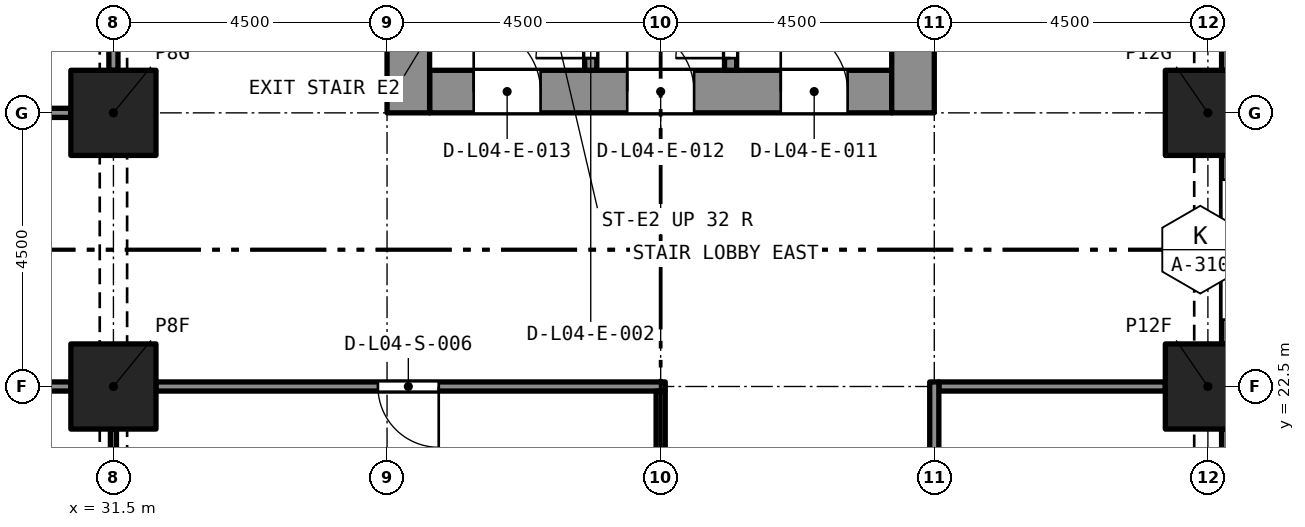
"""IFC4 building model, lengths in metres.
Left out: names, types, materials, properties, quantities, classifications, styles, units other than length and angle.
Written with IfcOpenShell. Run it as: python <this file> out.ifc"""

import sys

from ifc_helpers import new_model, si_unit, direction, frame, frame_2d, origin, origin_2d, place, context, subcontext, project, spatial, rectangle, extrude, element, fill, save


model = new_model("IFC4")
c1 = context("Model", 3, precision=1e-05, world=origin(), true_north=direction((0.0, 1.0)))
c2 = subcontext(c1, "Body", "Model", "MODEL_VIEW")
j1 = project(units=[si_unit("LENGTHUNIT", "METRE"), si_unit("PLANEANGLEUNIT", "RADIAN")], contexts=[c1])
p1 = place(None, origin())
s1 = spatial("IfcSite", under=j1, at=p1, CompositionType="ELEMENT")
p2 = place(p1, origin())
s2 = spatial("IfcBuilding", under=s1, at=p2, CompositionType="ELEMENT")
p3 = place(p2, frame((0.0, 0.0, 21.0)))
s3 = spatial("IfcBuildingStorey", under=s2, at=p3, CompositionType="ELEMENT", Elevation=21.0)
for number, where, z_axis, x_axis in (
    (1, (31.5, 22.5, 0.0), (0.0, 0.0, 1.0), (1.0, 0.0, 0.0)),
    (2, (49.5, 22.5, 0.0), (0.0, 0.0, 1.0), (1.0, 0.0, 0.0)),
    (3, (31.5, 27.0, 0.0), (0.0, 0.0, 1.0), (1.0, 0.0, 0.0)),
    (4, (49.5, 27.0, 0.0), (0.0, 0.0, 1.0), (1.0, 0.0, 0.0)),
):
    element("IfcColumn", number, at=place(p3, frame(where, z_axis=z_axis, x_axis=x_axis)), inside=s3, PredefinedType="COLUMN", context=c2, shape_type="SweptSolid", body=[
        extrude(rectangle(XDim=1.4, YDim=1.4, at=origin_2d()), origin(), (0.0, 0.0, 1.0), 5.0),
    ])
p4 = place(p3, frame((36.7, 27.35, 0.0), z_axis=(0.0, 0.0, 1.0), x_axis=(1.0, 0.0, 0.0)))
e5 = element("IfcWall", 5, at=p4, inside=s3, PredefinedType="SOLIDWALL", context=c2, shape_type="SweptSolid", body=[
    extrude(rectangle(XDim=7.6, YDim=0.7, at=frame_2d((3.8, 0.0))), origin(), (0.0, 0.0, 1.0), 5.0),
])
p5 = place(p4, frame((5.775, 0.0, 0.0)))
e6 = element("IfcOpeningElement", 6, at=p5, cuts=e5, PredefinedType="OPENING", context=c2, shape_type="SweptSolid", body=[
    extrude(rectangle(XDim=1.1, YDim=2.1, at=frame_2d((0.55, 1.05))), frame((0.0, 0.36, 0.0), z_axis=(0.0, -1.0, 0.0), x_axis=(1.0, 0.0, 0.0)), (0.0, 0.0, 1.0), 0.72),
])
p6 = place(p4, frame((3.25, 0.0, 0.0)))
e7 = element("IfcOpeningElement", 7, at=p6, cuts=e5, PredefinedType="OPENING", context=c2, shape_type="SweptSolid", body=[
    extrude(rectangle(XDim=1.1, YDim=2.1, at=frame_2d((0.55, 1.05))), frame((0.0, 0.36, 0.0), z_axis=(0.0, -1.0, 0.0), x_axis=(1.0, 0.0, 0.0)), (0.0, 0.0, 1.0), 0.72),
])
p7 = place(p4, frame((0.725, 0.0, 0.0)))
e8 = element("IfcOpeningElement", 8, at=p7, cuts=e5, PredefinedType="OPENING", context=c2, shape_type="SweptSolid", body=[
    extrude(rectangle(XDim=1.1, YDim=2.1, at=frame_2d((0.55, 1.05))), frame((0.0, 0.36, 0.0), z_axis=(0.0, -1.0, 0.0), x_axis=(1.0, 0.0, 0.0)), (0.0, 0.0, 1.0), 0.72),
])
p8 = place(p3, frame((36.35, 27.0, 0.0), z_axis=(0.0, 0.0, 1.0), x_axis=(0.0, 1.0, 0.0)))
e9 = element("IfcWall", 9, at=p8, inside=s3, PredefinedType="SOLIDWALL", context=c2, shape_type="SweptSolid", body=[
    extrude(rectangle(XDim=13.5, YDim=0.7, at=frame_2d((6.75, 0.0))), origin(), (0.0, 0.0, 1.0), 5.0),
])
p9 = place(p8, frame((8.95, 0.0, 0.0)))
e10 = element("IfcOpeningElement", 10, at=p9, cuts=e9, PredefinedType="OPENING", context=c2, shape_type="SweptSolid", body=[
    extrude(rectangle(XDim=1.2, YDim=2.1, at=frame_2d((0.6, 1.05))), frame((0.0, 0.36, 0.0), z_axis=(0.0, -1.0, 0.0), x_axis=(1.0, 0.0, 0.0)), (0.0, 0.0, 1.0), 0.72),
])
p10 = place(p3, frame((44.65, 27.0, 0.0), z_axis=(0.0, 0.0, 1.0), x_axis=(0.0, 1.0, 0.0)))
e11 = element("IfcWall", 11, at=p10, inside=s3, PredefinedType="SOLIDWALL", context=c2, shape_type="SweptSolid", body=[
    extrude(rectangle(XDim=13.5, YDim=0.7, at=frame_2d((6.75, 0.0))), origin(), (0.0, 0.0, 1.0), 5.0),
])
p11 = place(p10, frame((8.95, 0.0, 0.0)))
e12 = element("IfcOpeningElement", 12, at=p11, cuts=e11, PredefinedType="OPENING", context=c2, shape_type="SweptSolid", body=[
    extrude(rectangle(XDim=1.2, YDim=2.1, at=frame_2d((0.6, 1.05))), frame((0.0, 0.36, 0.0), z_axis=(0.0, -1.0, 0.0), x_axis=(1.0, 0.0, 0.0)), (0.0, 0.0, 1.0), 0.72),
])
p12 = place(p3, frame((49.875, 21.8, 0.0), z_axis=(0.0, 0.0, 1.0), x_axis=(0.0, -1.0, 0.0)))
e13 = element("IfcWall", 13, at=p12, inside=s3, PredefinedType="SOLIDWALL", context=c2, shape_type="SweptSolid", body=[
    extrude(rectangle(XDim=3.1, YDim=0.3, at=frame_2d((1.55, 0.0))), origin(), (0.0, 0.0, 1.0), 5.0),
])
p13 = place(p12, frame((0.4, 0.0, 0.45)))
e14 = element("IfcOpeningElement", 14, at=p13, cuts=e13, PredefinedType="OPENING", context=c2, shape_type="SweptSolid", body=[
    extrude(rectangle(XDim=2.3, YDim=3.3, at=frame_2d((1.15, 1.65))), frame((0.0, 0.16, 0.0), z_axis=(0.0, -1.0, 0.0), x_axis=(1.0, 0.0, 0.0)), (0.0, 0.0, 1.0), 0.32),
])
p14 = place(p3, frame((49.875, 26.3, 0.0), z_axis=(0.0, 0.0, 1.0), x_axis=(0.0, -1.0, 0.0)))
e15 = element("IfcWall", 15, at=p14, inside=s3, PredefinedType="SOLIDWALL", context=c2, shape_type="SweptSolid", body=[
    extrude(rectangle(XDim=3.1, YDim=0.3, at=frame_2d((1.55, 0.0))), origin(), (0.0, 0.0, 1.0), 5.0),
])
p15 = place(p14, frame((0.4, 0.0, 0.45)))
e16 = element("IfcOpeningElement", 16, at=p15, cuts=e15, PredefinedType="OPENING", context=c2, shape_type="SweptSolid", body=[
    extrude(rectangle(XDim=2.3, YDim=3.3, at=frame_2d((1.15, 1.65))), frame((0.0, 0.16, 0.0), z_axis=(0.0, -1.0, 0.0), x_axis=(1.0, 0.0, 0.0)), (0.0, 0.0, 1.0), 0.32),
])
p16 = place(p3, frame((49.875, 30.8, 0.0), z_axis=(0.0, 0.0, 1.0), x_axis=(0.0, -1.0, 0.0)))
e17 = element("IfcWall", 17, at=p16, inside=s3, PredefinedType="SOLIDWALL", context=c2, shape_type="SweptSolid", body=[
    extrude(rectangle(XDim=3.1, YDim=0.3, at=frame_2d((1.55, 0.0))), origin(), (0.0, 0.0, 1.0), 5.0),
])
p17 = place(p16, frame((0.4, 0.0, 0.45)))
e18 = element("IfcOpeningElement", 18, at=p17, cuts=e17, PredefinedType="OPENING", context=c2, shape_type="SweptSolid", body=[
    extrude(rectangle(XDim=2.3, YDim=3.3, at=frame_2d((1.15, 1.65))), frame((0.0, 0.16, 0.0), z_axis=(0.0, -1.0, 0.0), x_axis=(1.0, 0.0, 0.0)), (0.0, 0.0, 1.0), 0.32),
])
p18 = place(p3, frame((41.65, 27.7, 0.0), z_axis=(0.0, 0.0, 1.0), x_axis=(0.0, 1.0, 0.0)))
e19 = element("IfcWall", 19, at=p18, inside=s3, PredefinedType="SOLIDWALL", context=c2, shape_type="SweptSolid", body=[
    extrude(rectangle(XDim=5.4, YDim=0.2, at=frame_2d((2.7, 0.0))), origin(), (0.0, 0.0, 1.0), 4.65),
])
p19 = place(p18, frame((0.2, 0.0, 0.0)))
e20 = element("IfcOpeningElement", 20, at=p19, cuts=e19, PredefinedType="OPENING", context=c2, shape_type="SweptSolid", body=[
    extrude(rectangle(XDim=0.9, YDim=2.1, at=frame_2d((0.45, 1.05))), frame((0.0, 0.11, 0.0), z_axis=(0.0, -1.0, 0.0), x_axis=(1.0, 0.0, 0.0)), (0.0, 0.0, 1.0), 0.22),
])
p20 = place(p3, frame((39.35, 27.7, 0.0), z_axis=(0.0, 0.0, 1.0), x_axis=(0.0, 1.0, 0.0)))
e21 = element("IfcWall", 21, at=p20, inside=s3, PredefinedType="SOLIDWALL", context=c2, shape_type="SweptSolid", body=[
    extrude(rectangle(XDim=5.4, YDim=0.2, at=frame_2d((2.7, 0.0))), origin(), (0.0, 0.0, 1.0), 4.65),
])
p21 = place(p20, frame((0.2, 0.0, 0.0)))
e22 = element("IfcOpeningElement", 22, at=p21, cuts=e21, PredefinedType="OPENING", context=c2, shape_type="SweptSolid", body=[
    extrude(rectangle(XDim=0.9, YDim=2.1, at=frame_2d((0.45, 1.05))), frame((0.0, 0.11, 0.0), z_axis=(0.0, -1.0, 0.0), x_axis=(1.0, 0.0, 0.0)), (0.0, 0.0, 1.0), 0.22),
])
p22 = place(p3, frame((18.7, 27.0, 0.0), z_axis=(0.0, 0.0, 1.0), x_axis=(1.0, 0.0, 0.0)))
e23 = element("IfcWall", 23, at=p22, inside=s3, PredefinedType="PARTITIONING", context=c2, shape_type="SweptSolid", body=[
    extrude(rectangle(XDim=12.1, YDim=0.15, at=frame_2d((6.05, 0.0))), origin(), (0.0, 0.0, 1.0), 4.55),
])
p23 = place(p22, frame((5.45, 0.0, 0.0)))
e24 = element("IfcOpeningElement", 24, at=p23, cuts=e23, PredefinedType="OPENING", context=c2, shape_type="SweptSolid", body=[
    extrude(rectangle(XDim=1.2, YDim=2.1, at=frame_2d((0.6, 1.05))), frame((0.0, 0.085, 0.0), z_axis=(0.0, -1.0, 0.0), x_axis=(1.0, 0.0, 0.0)), (0.0, 0.0, 1.0), 0.17),
])
p24 = place(p3, frame((30.8, 22.5, 0.0), z_axis=(0.0, 0.0, 1.0), x_axis=(-1.0, 0.0, 0.0)))
e25 = element("IfcWall", 25, at=p24, inside=s3, PredefinedType="PARTITIONING", context=c2, shape_type="SweptSolid", body=[
    extrude(rectangle(XDim=12.1, YDim=0.15, at=frame_2d((6.05, 0.0))), origin(), (0.0, 0.0, 1.0), 4.55),
])
p25 = place(p24, frame((5.45, 0.0, 0.0)))
e26 = element("IfcOpeningElement", 26, at=p25, cuts=e25, PredefinedType="OPENING", context=c2, shape_type="SweptSolid", body=[
    extrude(rectangle(XDim=1.2, YDim=2.1, at=frame_2d((0.6, 1.05))), frame((0.0, 0.085, 0.0), z_axis=(0.0, -1.0, 0.0), x_axis=(1.0, 0.0, 0.0)), (0.0, 0.0, 1.0), 0.17),
])
p26 = place(p3, frame((31.5, 27.7, 0.0), z_axis=(0.0, 0.0, 1.0), x_axis=(0.0, 1.0, 0.0)))
e27 = element("IfcWall", 27, at=p26, inside=s3, PredefinedType="PARTITIONING", context=c2, shape_type="SweptSolid", body=[
    extrude(rectangle(XDim=3.1, YDim=0.15, at=frame_2d((1.55, 0.0))), origin(), (0.0, 0.0, 1.0), 4.18),
])
p27 = place(p3, frame((31.5, 18.7, 0.0), z_axis=(0.0, 0.0, 1.0), x_axis=(0.0, 1.0, 0.0)))
e28 = element("IfcWall", 28, at=p27, inside=s3, PredefinedType="PARTITIONING", context=c2, shape_type="SweptSolid", body=[
    extrude(rectangle(XDim=3.1, YDim=0.1, at=frame_2d((1.55, 0.0))), origin(), (0.0, 0.0, 1.0), 4.18),
])
p28 = place(p3, frame((40.575, 22.5, 0.0), z_axis=(0.0, 0.0, 1.0), x_axis=(-1.0, 0.0, 0.0)))
e29 = element("IfcWall", 29, at=p28, inside=s3, PredefinedType="PARTITIONING", context=c2, shape_type="SweptSolid", body=[
    extrude(rectangle(XDim=8.375, YDim=0.15, at=frame_2d((4.188, 0.0))), origin(), (0.0, 0.0, 1.0), 4.65),
])
p29 = place(p28, frame((3.725, 0.0, 0.0)))
e30 = element("IfcOpeningElement", 30, at=p29, cuts=e29, PredefinedType="OPENING", context=c2, shape_type="SweptSolid", body=[
    extrude(rectangle(XDim=1.0, YDim=2.1, at=frame_2d((0.5, 1.05))), frame((0.0, 0.085, 0.0), z_axis=(0.0, -1.0, 0.0), x_axis=(1.0, 0.0, 0.0)), (0.0, 0.0, 1.0), 0.17),
])
p30 = place(p3, frame((45.075, 22.5, 0.0), z_axis=(0.0, 0.0, 1.0), x_axis=(1.0, 0.0, 0.0)))
e31 = element("IfcWall", 31, at=p30, inside=s3, PredefinedType="PARTITIONING", context=c2, shape_type="SweptSolid", body=[
    extrude(rectangle(XDim=3.725, YDim=0.15, at=frame_2d((1.863, 0.0))), origin(), (0.0, 0.0, 1.0), 4.65),
])
p31 = place(p3, frame((40.5, 9.0, 0.0), z_axis=(0.0, 0.0, 1.0), x_axis=(0.0, 1.0, 0.0)))
e32 = element("IfcWall", 32, at=p31, inside=s3, PredefinedType="PARTITIONING", context=c2, shape_type="SweptSolid", body=[
    extrude(rectangle(XDim=13.425, YDim=0.15, at=frame_2d((6.712, 0.0))), origin(), (0.0, 0.0, 1.0), 4.65),
])
p32 = place(p31, frame((6.15, 0.0, 0.0)))
e33 = element("IfcOpeningElement", 33, at=p32, cuts=e32, PredefinedType="OPENING", context=c2, shape_type="SweptSolid", body=[
    extrude(rectangle(XDim=1.2, YDim=2.1, at=frame_2d((0.6, 1.05))), frame((0.0, 0.085, 0.0), z_axis=(0.0, -1.0, 0.0), x_axis=(1.0, 0.0, 0.0)), (0.0, 0.0, 1.0), 0.17),
])
p33 = place(p3, frame((45.0, 22.575, 0.0), z_axis=(0.0, 0.0, 1.0), x_axis=(0.0, -1.0, 0.0)))
e34 = element("IfcWall", 34, at=p33, inside=s3, PredefinedType="PARTITIONING", context=c2, shape_type="SweptSolid", body=[
    extrude(rectangle(XDim=9.075, YDim=0.15, at=frame_2d((4.538, 0.0))), origin(), (0.0, 0.0, 1.0), 4.65),
])
p34 = place(p33, frame((4.175, 0.0, 0.0)))
e35 = element("IfcOpeningElement", 35, at=p34, cuts=e34, PredefinedType="OPENING", context=c2, shape_type="SweptSolid", body=[
    extrude(rectangle(XDim=0.8, YDim=2.1, at=frame_2d((0.4, 1.05))), frame((0.0, 0.085, 0.0), z_axis=(0.0, -1.0, 0.0), x_axis=(1.0, 0.0, 0.0)), (0.0, 0.0, 1.0), 0.17),
])
p35 = place(p19, origin())
e36 = element("IfcDoor", 36, at=p35, inside=s3, OperationType="SINGLE_SWING_LEFT", PredefinedType="DOOR", context=c2, shape_type="SweptSolid", body=[
    extrude(rectangle(XDim=0.9, YDim=2.1, at=frame_2d((0.45, 1.05))), frame((0.0, 0.025, 0.0), z_axis=(0.0, -1.0, 0.0), x_axis=(1.0, 0.0, 0.0)), (0.0, 0.0, 1.0), 0.05),
])
fill(e20, e36)
p36 = place(p21, origin())
e37 = element("IfcDoor", 37, at=p36, inside=s3, OperationType="SINGLE_SWING_LEFT", PredefinedType="DOOR", context=c2, shape_type="SweptSolid", body=[
    extrude(rectangle(XDim=0.9, YDim=2.1, at=frame_2d((0.45, 1.05))), frame((0.0, 0.025, 0.0), z_axis=(0.0, -1.0, 0.0), x_axis=(1.0, 0.0, 0.0)), (0.0, 0.0, 1.0), 0.05),
])
fill(e22, e37)
p37 = place(p5, origin())
e38 = element("IfcDoor", 38, at=p37, inside=s3, OperationType="SINGLE_SWING_LEFT", PredefinedType="DOOR", context=c2, shape_type="SweptSolid", body=[
    extrude(rectangle(XDim=1.1, YDim=2.1, at=frame_2d((0.55, 1.05))), frame((0.0, 0.025, 0.0), z_axis=(0.0, -1.0, 0.0), x_axis=(1.0, 0.0, 0.0)), (0.0, 0.0, 1.0), 0.05),
])
fill(e6, e38)
p38 = place(p6, origin())
e39 = element("IfcDoor", 39, at=p38, inside=s3, OperationType="SINGLE_SWING_LEFT", PredefinedType="DOOR", context=c2, shape_type="SweptSolid", body=[
    extrude(rectangle(XDim=1.1, YDim=2.1, at=frame_2d((0.55, 1.05))), frame((0.0, 0.025, 0.0), z_axis=(0.0, -1.0, 0.0), x_axis=(1.0, 0.0, 0.0)), (0.0, 0.0, 1.0), 0.05),
])
fill(e7, e39)
p39 = place(p7, origin())
e40 = element("IfcDoor", 40, at=p39, inside=s3, OperationType="SINGLE_SWING_LEFT", PredefinedType="DOOR", context=c2, shape_type="SweptSolid", body=[
    extrude(rectangle(XDim=1.1, YDim=2.1, at=frame_2d((0.55, 1.05))), frame((0.0, 0.025, 0.0), z_axis=(0.0, -1.0, 0.0), x_axis=(1.0, 0.0, 0.0)), (0.0, 0.0, 1.0), 0.05),
])
fill(e8, e40)
p40 = place(p29, origin())
e41 = element("IfcDoor", 41, at=p40, inside=s3, OperationType="SINGLE_SWING_RIGHT", PredefinedType="DOOR", context=c2, shape_type="SweptSolid", body=[
    extrude(rectangle(XDim=1.0, YDim=2.1, at=frame_2d((0.5, 1.05))), frame((0.0, 0.025, 0.0), z_axis=(0.0, -1.0, 0.0), x_axis=(1.0, 0.0, 0.0)), (0.0, 0.0, 1.0), 0.05),
])
fill(e30, e41)
save(model, sys.argv[1])
